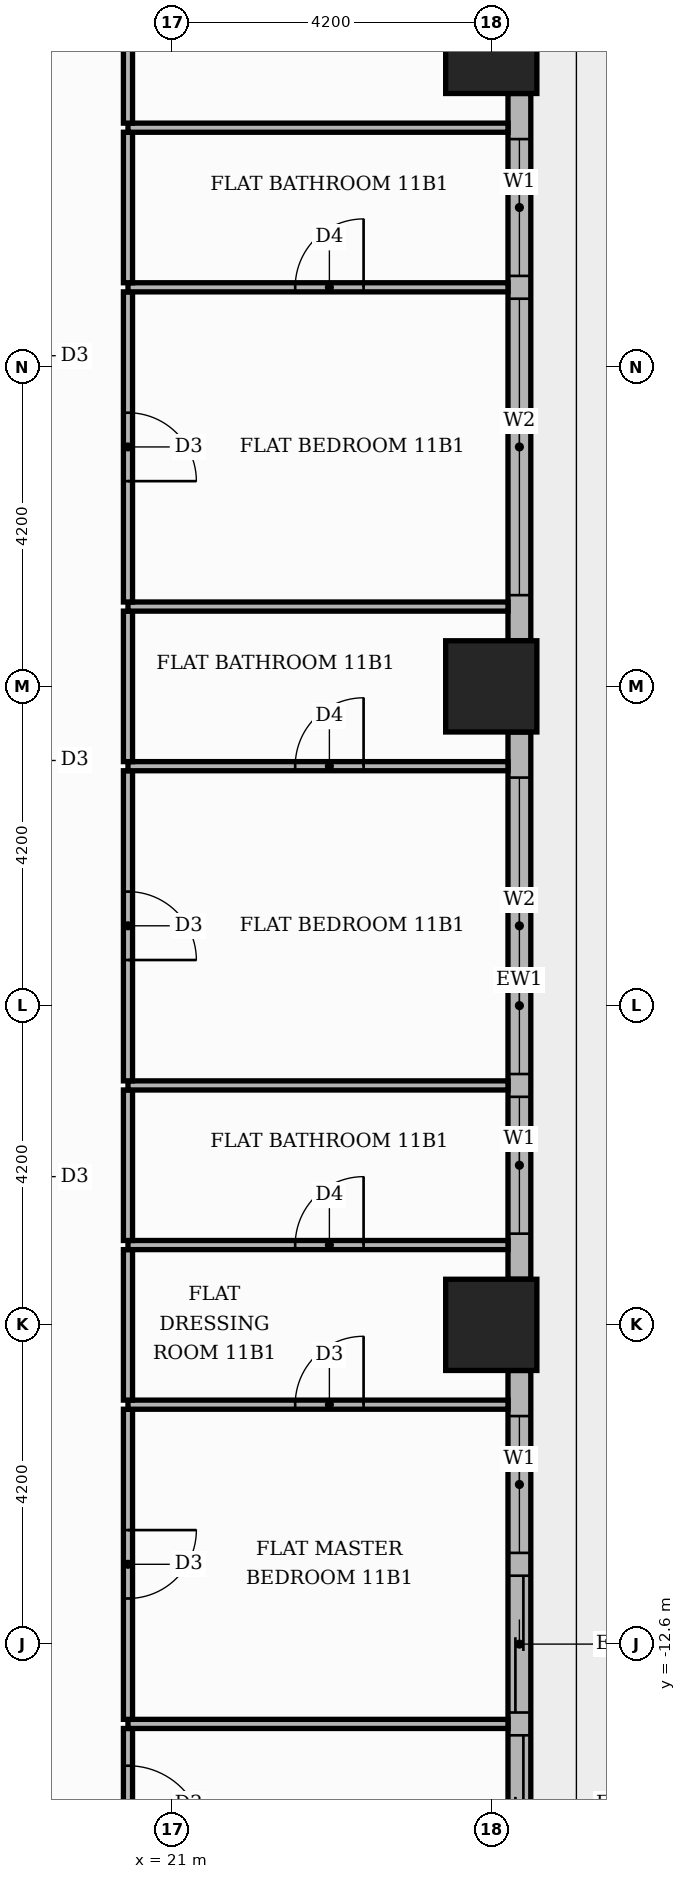
"""IFC4 building model, lengths in metres.
Left out: names, types, materials, properties, quantities, classifications, styles, units other than length and angle.
Written with IfcOpenShell. Run it as: python <this file> out.ifc"""

import sys

from ifc_helpers import new_model, si_unit, direction, frame, frame_2d, origin, origin_2d, place, context, subcontext, project, spatial, rectangle, extrude, element, fill, save


model = new_model("IFC4")
c1 = context("Model", 3, precision=1e-05, world=origin(), true_north=direction((0.0, 1.0)))
c2 = subcontext(c1, "Body", "Model", "MODEL_VIEW")
j1 = project(units=[si_unit("LENGTHUNIT", "METRE"), si_unit("PLANEANGLEUNIT", "RADIAN")], contexts=[c1])
p1 = place(None, origin())
s1 = spatial("IfcSite", under=j1, at=p1, CompositionType="ELEMENT")
p2 = place(p1, origin())
s2 = spatial("IfcBuilding", under=s1, at=p2, CompositionType="ELEMENT")
p3 = place(p2, frame((0.0, 0.0, 50.4)))
s3 = spatial("IfcBuildingStorey", under=s2, at=p3, CompositionType="ELEMENT", Elevation=50.4)
for number, where, z_axis, x_axis in (
    (1, (25.2, 0.0, 0.0), (0.0, 0.0, 1.0), (1.0, 0.0, 0.0)),
    (2, (25.2, 8.4, 0.0), (0.0, 0.0, 1.0), (1.0, 0.0, 0.0)),
    (3, (25.2, -8.4, 0.0), (0.0, 0.0, 1.0), (1.0, 0.0, 0.0)),
):
    element("IfcColumn", number, at=place(p3, frame(where, z_axis=z_axis, x_axis=x_axis)), inside=s3, PredefinedType="COLUMN", context=c2, shape_type="SweptSolid", body=[
        extrude(rectangle(XDim=1.2, YDim=1.2, at=origin_2d()), origin(), (0.0, 0.0, 1.0), 3.9),
    ])
p4 = place(p3, frame((25.57, -16.2, 0.0), z_axis=(0.0, 0.0, 1.0), x_axis=(0.0, 1.0, 0.0)))
e4 = element("IfcWall", 4, at=p4, inside=s3, PredefinedType="STANDARD", context=c2, shape_type="SweptSolid", body=[
    extrude(rectangle(XDim=7.2, YDim=0.3, at=frame_2d((3.6, 0.0))), origin(), (0.0, 0.0, 1.0), 3.48),
])
p5 = place(p4, frame((0.6, 0.0, 0.0)))
e5 = element("IfcOpeningElement", 5, at=p5, cuts=e4, PredefinedType="OPENING", context=c2, shape_type="SweptSolid", body=[
    extrude(rectangle(XDim=1.8, YDim=2.4, at=frame_2d((0.9, 1.2))), frame((0.0, 0.16, 0.0), z_axis=(0.0, -1.0, 0.0), x_axis=(1.0, 0.0, 0.0)), (0.0, 0.0, 1.0), 0.32),
])
p6 = place(p4, frame((2.7, 0.0, 0.0)))
e6 = element("IfcOpeningElement", 6, at=p6, cuts=e4, PredefinedType="OPENING", context=c2, shape_type="SweptSolid", body=[
    extrude(rectangle(XDim=1.8, YDim=2.4, at=frame_2d((0.9, 1.2))), frame((0.0, 0.16, 0.0), z_axis=(0.0, -1.0, 0.0), x_axis=(1.0, 0.0, 0.0)), (0.0, 0.0, 1.0), 0.32),
])
p7 = place(p4, frame((4.8, 0.0, 0.9)))
e7 = element("IfcOpeningElement", 7, at=p7, cuts=e4, PredefinedType="OPENING", context=c2, shape_type="SweptSolid", body=[
    extrude(rectangle(XDim=1.8, YDim=2.1, at=frame_2d((0.9, 1.05))), frame((0.0, 0.16, 0.0), z_axis=(0.0, -1.0, 0.0), x_axis=(1.0, 0.0, 0.0)), (0.0, 0.0, 1.0), 0.32),
])
p8 = place(p3, frame((25.57, -7.8, 0.0), z_axis=(0.0, 0.0, 1.0), x_axis=(0.0, 1.0, 0.0)))
e8 = element("IfcWall", 8, at=p8, inside=s3, PredefinedType="STANDARD", context=c2, shape_type="SweptSolid", body=[
    extrude(rectangle(XDim=7.2, YDim=0.3, at=frame_2d((3.6, 0.0))), origin(), (0.0, 0.0, 1.0), 3.48),
])
p9 = place(p8, frame((0.6, 0.0, 0.9)))
e9 = element("IfcOpeningElement", 9, at=p9, cuts=e8, PredefinedType="OPENING", context=c2, shape_type="SweptSolid", body=[
    extrude(rectangle(XDim=1.8, YDim=2.1, at=frame_2d((0.9, 1.05))), frame((0.0, 0.16, 0.0), z_axis=(0.0, -1.0, 0.0), x_axis=(1.0, 0.0, 0.0)), (0.0, 0.0, 1.0), 0.32),
])
p10 = place(p8, frame((2.7, 0.0, 0.9)))
e10 = element("IfcOpeningElement", 10, at=p10, cuts=e8, PredefinedType="OPENING", context=c2, shape_type="SweptSolid", body=[
    extrude(rectangle(XDim=3.9, YDim=2.1, at=frame_2d((1.95, 1.05))), frame((0.0, 0.16, 0.0), z_axis=(0.0, -1.0, 0.0), x_axis=(1.0, 0.0, 0.0)), (0.0, 0.0, 1.0), 0.32),
])
p11 = place(p3, frame((25.57, 0.6, 0.0), z_axis=(0.0, 0.0, 1.0), x_axis=(0.0, 1.0, 0.0)))
e11 = element("IfcWall", 11, at=p11, inside=s3, PredefinedType="STANDARD", context=c2, shape_type="SweptSolid", body=[
    extrude(rectangle(XDim=7.2, YDim=0.3, at=frame_2d((3.6, 0.0))), origin(), (0.0, 0.0, 1.0), 3.48),
])
p12 = place(p11, frame((0.6, 0.0, 0.9)))
e12 = element("IfcOpeningElement", 12, at=p12, cuts=e11, PredefinedType="OPENING", context=c2, shape_type="SweptSolid", body=[
    extrude(rectangle(XDim=3.9, YDim=2.1, at=frame_2d((1.95, 1.05))), frame((0.0, 0.16, 0.0), z_axis=(0.0, -1.0, 0.0), x_axis=(1.0, 0.0, 0.0)), (0.0, 0.0, 1.0), 0.32),
])
p13 = place(p11, frame((4.8, 0.0, 0.9)))
e13 = element("IfcOpeningElement", 13, at=p13, cuts=e11, PredefinedType="OPENING", context=c2, shape_type="SweptSolid", body=[
    extrude(rectangle(XDim=1.8, YDim=2.1, at=frame_2d((0.9, 1.05))), frame((0.0, 0.16, 0.0), z_axis=(0.0, -1.0, 0.0), x_axis=(1.0, 0.0, 0.0)), (0.0, 0.0, 1.0), 0.32),
])
p14 = place(p3, frame((20.42, -15.69, 0.0), z_axis=(0.0, 0.0, 1.0), x_axis=(0.0, 1.0, 0.0)))
e14 = element("IfcWall", 14, at=p14, inside=s3, PredefinedType="PARTITIONING", context=c2, shape_type="SweptSolid", body=[
    extrude(rectangle(XDim=1.98, YDim=0.12, at=frame_2d((0.99, 0.0))), origin(), (0.0, 0.0, 1.0), 3.48),
])
p15 = place(p14, frame((0.49, 0.0, 0.0)))
e15 = element("IfcOpeningElement", 15, at=p15, cuts=e14, PredefinedType="OPENING", context=c2, shape_type="SweptSolid", body=[
    extrude(rectangle(XDim=1.0, YDim=2.1, at=frame_2d((0.5, 1.05))), frame((0.0, 0.07, 0.0), z_axis=(0.0, -1.0, 0.0), x_axis=(1.0, 0.0, 0.0)), (0.0, 0.0, 1.0), 0.14),
])
p16 = place(p3, frame((20.42, -13.65, 0.0), z_axis=(0.0, 0.0, 1.0), x_axis=(1.0, 0.0, 0.0)))
e16 = element("IfcWall", 16, at=p16, inside=s3, PredefinedType="PARTITIONING", context=c2, shape_type="SweptSolid", body=[
    extrude(rectangle(XDim=5.0, YDim=0.12, at=frame_2d((2.5, 0.0))), origin(), (0.0, 0.0, 1.0), 3.48),
])
p17 = place(p3, frame((20.42, -13.59, 0.0), z_axis=(0.0, 0.0, 1.0), x_axis=(0.0, 1.0, 0.0)))
e17 = element("IfcWall", 17, at=p17, inside=s3, PredefinedType="PARTITIONING", context=c2, shape_type="SweptSolid", body=[
    extrude(rectangle(XDim=4.08, YDim=0.12, at=frame_2d((2.04, 0.0))), origin(), (0.0, 0.0, 1.0), 3.48),
])
p18 = place(p17, frame((1.59, 0.0, 0.0)))
e18 = element("IfcOpeningElement", 18, at=p18, cuts=e17, PredefinedType="OPENING", context=c2, shape_type="SweptSolid", body=[
    extrude(rectangle(XDim=0.9, YDim=2.1, at=frame_2d((0.45, 1.05))), frame((0.0, 0.07, 0.0), z_axis=(0.0, -1.0, 0.0), x_axis=(1.0, 0.0, 0.0)), (0.0, 0.0, 1.0), 0.14),
])
p19 = place(p3, frame((20.42, -9.45, 0.0), z_axis=(0.0, 0.0, 1.0), x_axis=(1.0, 0.0, 0.0)))
e19 = element("IfcWall", 19, at=p19, inside=s3, PredefinedType="PARTITIONING", context=c2, shape_type="SweptSolid", body=[
    extrude(rectangle(XDim=5.0, YDim=0.12, at=frame_2d((2.5, 0.0))), origin(), (0.0, 0.0, 1.0), 3.48),
])
p20 = place(p19, frame((2.2, 0.0, 0.0)))
e20 = element("IfcOpeningElement", 20, at=p20, cuts=e19, PredefinedType="OPENING", context=c2, shape_type="SweptSolid", body=[
    extrude(rectangle(XDim=0.9, YDim=2.1, at=frame_2d((0.45, 1.05))), frame((0.0, 0.07, 0.0), z_axis=(0.0, -1.0, 0.0), x_axis=(1.0, 0.0, 0.0)), (0.0, 0.0, 1.0), 0.14),
])
p21 = place(p3, frame((20.42, -9.39, 0.0), z_axis=(0.0, 0.0, 1.0), x_axis=(0.0, 1.0, 0.0)))
e21 = element("IfcWall", 21, at=p21, inside=s3, PredefinedType="PARTITIONING", context=c2, shape_type="SweptSolid", body=[
    extrude(rectangle(XDim=1.98, YDim=0.12, at=frame_2d((0.99, 0.0))), origin(), (0.0, 0.0, 1.0), 3.48),
])
p22 = place(p3, frame((20.42, -7.35, 0.0), z_axis=(0.0, 0.0, 1.0), x_axis=(1.0, 0.0, 0.0)))
e22 = element("IfcWall", 22, at=p22, inside=s3, PredefinedType="PARTITIONING", context=c2, shape_type="SweptSolid", body=[
    extrude(rectangle(XDim=5.0, YDim=0.12, at=frame_2d((2.5, 0.0))), origin(), (0.0, 0.0, 1.0), 3.48),
])
p23 = place(p22, frame((2.2, 0.0, 0.0)))
e23 = element("IfcOpeningElement", 23, at=p23, cuts=e22, PredefinedType="OPENING", context=c2, shape_type="SweptSolid", body=[
    extrude(rectangle(XDim=0.9, YDim=2.1, at=frame_2d((0.45, 1.05))), frame((0.0, 0.07, 0.0), z_axis=(0.0, -1.0, 0.0), x_axis=(1.0, 0.0, 0.0)), (0.0, 0.0, 1.0), 0.14),
])
p24 = place(p3, frame((20.42, -7.29, 0.0), z_axis=(0.0, 0.0, 1.0), x_axis=(0.0, 1.0, 0.0)))
e24 = element("IfcWall", 24, at=p24, inside=s3, PredefinedType="PARTITIONING", context=c2, shape_type="SweptSolid", body=[
    extrude(rectangle(XDim=1.98, YDim=0.12, at=frame_2d((0.99, 0.0))), origin(), (0.0, 0.0, 1.0), 3.48),
])
p25 = place(p3, frame((20.42, -5.25, 0.0), z_axis=(0.0, 0.0, 1.0), x_axis=(1.0, 0.0, 0.0)))
e25 = element("IfcWall", 25, at=p25, inside=s3, PredefinedType="PARTITIONING", context=c2, shape_type="SweptSolid", body=[
    extrude(rectangle(XDim=5.0, YDim=0.12, at=frame_2d((2.5, 0.0))), origin(), (0.0, 0.0, 1.0), 3.48),
])
p26 = place(p3, frame((20.42, -5.19, 0.0), z_axis=(0.0, 0.0, 1.0), x_axis=(0.0, 1.0, 0.0)))
e26 = element("IfcWall", 26, at=p26, inside=s3, PredefinedType="PARTITIONING", context=c2, shape_type="SweptSolid", body=[
    extrude(rectangle(XDim=4.08, YDim=0.12, at=frame_2d((2.04, 0.0))), origin(), (0.0, 0.0, 1.0), 3.48),
])
p27 = place(p26, frame((1.59, 0.0, 0.0)))
e27 = element("IfcOpeningElement", 27, at=p27, cuts=e26, PredefinedType="OPENING", context=c2, shape_type="SweptSolid", body=[
    extrude(rectangle(XDim=0.9, YDim=2.1, at=frame_2d((0.45, 1.05))), frame((0.0, 0.07, 0.0), z_axis=(0.0, -1.0, 0.0), x_axis=(1.0, 0.0, 0.0)), (0.0, 0.0, 1.0), 0.14),
])
p28 = place(p3, frame((20.42, -1.05, 0.0), z_axis=(0.0, 0.0, 1.0), x_axis=(1.0, 0.0, 0.0)))
e28 = element("IfcWall", 28, at=p28, inside=s3, PredefinedType="PARTITIONING", context=c2, shape_type="SweptSolid", body=[
    extrude(rectangle(XDim=5.0, YDim=0.12, at=frame_2d((2.5, 0.0))), origin(), (0.0, 0.0, 1.0), 3.48),
])
p29 = place(p28, frame((2.2, 0.0, 0.0)))
e29 = element("IfcOpeningElement", 29, at=p29, cuts=e28, PredefinedType="OPENING", context=c2, shape_type="SweptSolid", body=[
    extrude(rectangle(XDim=0.9, YDim=2.1, at=frame_2d((0.45, 1.05))), frame((0.0, 0.07, 0.0), z_axis=(0.0, -1.0, 0.0), x_axis=(1.0, 0.0, 0.0)), (0.0, 0.0, 1.0), 0.14),
])
p30 = place(p3, frame((20.42, -0.99, 0.0), z_axis=(0.0, 0.0, 1.0), x_axis=(0.0, 1.0, 0.0)))
e30 = element("IfcWall", 30, at=p30, inside=s3, PredefinedType="PARTITIONING", context=c2, shape_type="SweptSolid", body=[
    extrude(rectangle(XDim=1.98, YDim=0.12, at=frame_2d((0.99, 0.0))), origin(), (0.0, 0.0, 1.0), 3.48),
])
p31 = place(p3, frame((20.42, 1.05, 0.0), z_axis=(0.0, 0.0, 1.0), x_axis=(1.0, 0.0, 0.0)))
e31 = element("IfcWall", 31, at=p31, inside=s3, PredefinedType="PARTITIONING", context=c2, shape_type="SweptSolid", body=[
    extrude(rectangle(XDim=5.0, YDim=0.12, at=frame_2d((2.5, 0.0))), origin(), (0.0, 0.0, 1.0), 3.48),
])
p32 = place(p3, frame((20.42, 1.11, 0.0), z_axis=(0.0, 0.0, 1.0), x_axis=(0.0, 1.0, 0.0)))
e32 = element("IfcWall", 32, at=p32, inside=s3, PredefinedType="PARTITIONING", context=c2, shape_type="SweptSolid", body=[
    extrude(rectangle(XDim=4.08, YDim=0.12, at=frame_2d((2.04, 0.0))), origin(), (0.0, 0.0, 1.0), 3.48),
])
p33 = place(p32, frame((1.59, 0.0, 0.0)))
e33 = element("IfcOpeningElement", 33, at=p33, cuts=e32, PredefinedType="OPENING", context=c2, shape_type="SweptSolid", body=[
    extrude(rectangle(XDim=0.9, YDim=2.1, at=frame_2d((0.45, 1.05))), frame((0.0, 0.07, 0.0), z_axis=(0.0, -1.0, 0.0), x_axis=(1.0, 0.0, 0.0)), (0.0, 0.0, 1.0), 0.14),
])
p34 = place(p3, frame((20.42, 5.25, 0.0), z_axis=(0.0, 0.0, 1.0), x_axis=(1.0, 0.0, 0.0)))
e34 = element("IfcWall", 34, at=p34, inside=s3, PredefinedType="PARTITIONING", context=c2, shape_type="SweptSolid", body=[
    extrude(rectangle(XDim=5.0, YDim=0.12, at=frame_2d((2.5, 0.0))), origin(), (0.0, 0.0, 1.0), 3.48),
])
p35 = place(p34, frame((2.2, 0.0, 0.0)))
e35 = element("IfcOpeningElement", 35, at=p35, cuts=e34, PredefinedType="OPENING", context=c2, shape_type="SweptSolid", body=[
    extrude(rectangle(XDim=0.9, YDim=2.1, at=frame_2d((0.45, 1.05))), frame((0.0, 0.07, 0.0), z_axis=(0.0, -1.0, 0.0), x_axis=(1.0, 0.0, 0.0)), (0.0, 0.0, 1.0), 0.14),
])
p36 = place(p3, frame((20.42, 5.31, 0.0), z_axis=(0.0, 0.0, 1.0), x_axis=(0.0, 1.0, 0.0)))
e36 = element("IfcWall", 36, at=p36, inside=s3, PredefinedType="PARTITIONING", context=c2, shape_type="SweptSolid", body=[
    extrude(rectangle(XDim=1.98, YDim=0.12, at=frame_2d((0.99, 0.0))), origin(), (0.0, 0.0, 1.0), 3.48),
])
p37 = place(p3, frame((20.42, 7.35, 0.0), z_axis=(0.0, 0.0, 1.0), x_axis=(1.0, 0.0, 0.0)))
e37 = element("IfcWall", 37, at=p37, inside=s3, PredefinedType="PARTITIONING", context=c2, shape_type="SweptSolid", body=[
    extrude(rectangle(XDim=5.0, YDim=0.12, at=frame_2d((2.5, 0.0))), origin(), (0.0, 0.0, 1.0), 3.48),
])
p38 = place(p3, frame((20.42, 7.41, 0.0), z_axis=(0.0, 0.0, 1.0), x_axis=(0.0, 1.0, 0.0)))
e38 = element("IfcWall", 38, at=p38, inside=s3, PredefinedType="PARTITIONING", context=c2, shape_type="SweptSolid", body=[
    extrude(rectangle(XDim=4.08, YDim=0.12, at=frame_2d((2.04, 0.0))), origin(), (0.0, 0.0, 1.0), 3.48),
])
p39 = place(p38, frame((1.59, 0.0, 0.0)))
e39 = element("IfcOpeningElement", 39, at=p39, cuts=e38, PredefinedType="OPENING", context=c2, shape_type="SweptSolid", body=[
    extrude(rectangle(XDim=0.9, YDim=2.1, at=frame_2d((0.45, 1.05))), frame((0.0, 0.07, 0.0), z_axis=(0.0, -1.0, 0.0), x_axis=(1.0, 0.0, 0.0)), (0.0, 0.0, 1.0), 0.14),
])
p40 = place(p5, origin())
e40 = element("IfcDoor", 40, at=p40, inside=s3, OperationType="SLIDING_TO_LEFT", PredefinedType="DOOR", context=c2, shape_type="SweptSolid", body=[
    extrude(rectangle(XDim=1.8, YDim=2.4, at=frame_2d((0.9, 1.2))), frame((0.0, 0.025, 0.0), z_axis=(0.0, -1.0, 0.0), x_axis=(1.0, 0.0, 0.0)), (0.0, 0.0, 1.0), 0.05),
])
fill(e5, e40)
p41 = place(p6, origin())
e41 = element("IfcDoor", 41, at=p41, inside=s3, OperationType="SLIDING_TO_RIGHT", PredefinedType="DOOR", context=c2, shape_type="SweptSolid", body=[
    extrude(rectangle(XDim=1.8, YDim=2.4, at=frame_2d((0.9, 1.2))), frame((0.0, 0.025, 0.0), z_axis=(0.0, -1.0, 0.0), x_axis=(1.0, 0.0, 0.0)), (0.0, 0.0, 1.0), 0.05),
])
fill(e6, e41)
p42 = place(p7, origin())
e42 = element("IfcWindow", 42, at=p42, inside=s3, PartitioningType="SINGLE_PANEL", PredefinedType="WINDOW", context=c2, shape_type="SweptSolid", body=[
    extrude(rectangle(XDim=1.8, YDim=2.1, at=frame_2d((0.9, 1.05))), frame((0.0, 0.03, 0.0), z_axis=(0.0, -1.0, 0.0), x_axis=(1.0, 0.0, 0.0)), (0.0, 0.0, 1.0), 0.06),
])
fill(e7, e42)
p43 = place(p9, origin())
e43 = element("IfcWindow", 43, at=p43, inside=s3, PartitioningType="SINGLE_PANEL", PredefinedType="WINDOW", context=c2, shape_type="SweptSolid", body=[
    extrude(rectangle(XDim=1.8, YDim=2.1, at=frame_2d((0.9, 1.05))), frame((0.0, 0.03, 0.0), z_axis=(0.0, -1.0, 0.0), x_axis=(1.0, 0.0, 0.0)), (0.0, 0.0, 1.0), 0.06),
])
fill(e9, e43)
p44 = place(p10, origin())
e44 = element("IfcWindow", 44, at=p44, inside=s3, PartitioningType="SINGLE_PANEL", PredefinedType="WINDOW", context=c2, shape_type="SweptSolid", body=[
    extrude(rectangle(XDim=3.9, YDim=2.1, at=frame_2d((1.95, 1.05))), frame((0.0, 0.03, 0.0), z_axis=(0.0, -1.0, 0.0), x_axis=(1.0, 0.0, 0.0)), (0.0, 0.0, 1.0), 0.06),
])
fill(e10, e44)
p45 = place(p12, origin())
e45 = element("IfcWindow", 45, at=p45, inside=s3, PartitioningType="SINGLE_PANEL", PredefinedType="WINDOW", context=c2, shape_type="SweptSolid", body=[
    extrude(rectangle(XDim=3.9, YDim=2.1, at=frame_2d((1.95, 1.05))), frame((0.0, 0.03, 0.0), z_axis=(0.0, -1.0, 0.0), x_axis=(1.0, 0.0, 0.0)), (0.0, 0.0, 1.0), 0.06),
])
fill(e12, e45)
p46 = place(p13, origin())
e46 = element("IfcWindow", 46, at=p46, inside=s3, PartitioningType="SINGLE_PANEL", PredefinedType="WINDOW", context=c2, shape_type="SweptSolid", body=[
    extrude(rectangle(XDim=1.8, YDim=2.1, at=frame_2d((0.9, 1.05))), frame((0.0, 0.03, 0.0), z_axis=(0.0, -1.0, 0.0), x_axis=(1.0, 0.0, 0.0)), (0.0, 0.0, 1.0), 0.06),
])
fill(e13, e46)
p47 = place(p15, frame((1.0, 0.0, 0.0), z_axis=(0.0, 0.0, 1.0), x_axis=(-1.0, 0.0, 0.0)))
e47 = element("IfcDoor", 47, at=p47, inside=s3, OperationType="SINGLE_SWING_LEFT", PredefinedType="DOOR", context=c2, shape_type="SweptSolid", body=[
    extrude(rectangle(XDim=1.0, YDim=2.1, at=frame_2d((0.5, 1.05))), frame((0.0, 0.025, 0.0), z_axis=(0.0, -1.0, 0.0), x_axis=(1.0, 0.0, 0.0)), (0.0, 0.0, 1.0), 0.05),
])
fill(e15, e47)
p48 = place(p18, frame((0.9, 0.0, 0.0), z_axis=(0.0, 0.0, 1.0), x_axis=(-1.0, 0.0, 0.0)))
e48 = element("IfcDoor", 48, at=p48, inside=s3, OperationType="SINGLE_SWING_RIGHT", PredefinedType="DOOR", context=c2, shape_type="SweptSolid", body=[
    extrude(rectangle(XDim=0.9, YDim=2.1, at=frame_2d((0.45, 1.05))), frame((0.0, 0.025, 0.0), z_axis=(0.0, -1.0, 0.0), x_axis=(1.0, 0.0, 0.0)), (0.0, 0.0, 1.0), 0.05),
])
fill(e18, e48)
p49 = place(p20, origin())
e49 = element("IfcDoor", 49, at=p49, inside=s3, OperationType="SINGLE_SWING_RIGHT", PredefinedType="DOOR", context=c2, shape_type="SweptSolid", body=[
    extrude(rectangle(XDim=0.9, YDim=2.1, at=frame_2d((0.45, 1.05))), frame((0.0, 0.025, 0.0), z_axis=(0.0, -1.0, 0.0), x_axis=(1.0, 0.0, 0.0)), (0.0, 0.0, 1.0), 0.05),
])
fill(e20, e49)
p50 = place(p23, origin())
e50 = element("IfcDoor", 50, at=p50, inside=s3, OperationType="SINGLE_SWING_RIGHT", PredefinedType="DOOR", context=c2, shape_type="SweptSolid", body=[
    extrude(rectangle(XDim=0.9, YDim=2.1, at=frame_2d((0.45, 1.05))), frame((0.0, 0.025, 0.0), z_axis=(0.0, -1.0, 0.0), x_axis=(1.0, 0.0, 0.0)), (0.0, 0.0, 1.0), 0.05),
])
fill(e23, e50)
p51 = place(p27, frame((0.9, 0.0, 0.0), z_axis=(0.0, 0.0, 1.0), x_axis=(-1.0, 0.0, 0.0)))
e51 = element("IfcDoor", 51, at=p51, inside=s3, OperationType="SINGLE_SWING_LEFT", PredefinedType="DOOR", context=c2, shape_type="SweptSolid", body=[
    extrude(rectangle(XDim=0.9, YDim=2.1, at=frame_2d((0.45, 1.05))), frame((0.0, 0.025, 0.0), z_axis=(0.0, -1.0, 0.0), x_axis=(1.0, 0.0, 0.0)), (0.0, 0.0, 1.0), 0.05),
])
fill(e27, e51)
p52 = place(p29, origin())
e52 = element("IfcDoor", 52, at=p52, inside=s3, OperationType="SINGLE_SWING_RIGHT", PredefinedType="DOOR", context=c2, shape_type="SweptSolid", body=[
    extrude(rectangle(XDim=0.9, YDim=2.1, at=frame_2d((0.45, 1.05))), frame((0.0, 0.025, 0.0), z_axis=(0.0, -1.0, 0.0), x_axis=(1.0, 0.0, 0.0)), (0.0, 0.0, 1.0), 0.05),
])
fill(e29, e52)
p53 = place(p33, frame((0.9, 0.0, 0.0), z_axis=(0.0, 0.0, 1.0), x_axis=(-1.0, 0.0, 0.0)))
e53 = element("IfcDoor", 53, at=p53, inside=s3, OperationType="SINGLE_SWING_LEFT", PredefinedType="DOOR", context=c2, shape_type="SweptSolid", body=[
    extrude(rectangle(XDim=0.9, YDim=2.1, at=frame_2d((0.45, 1.05))), frame((0.0, 0.025, 0.0), z_axis=(0.0, -1.0, 0.0), x_axis=(1.0, 0.0, 0.0)), (0.0, 0.0, 1.0), 0.05),
])
fill(e33, e53)
p54 = place(p35, origin())
e54 = element("IfcDoor", 54, at=p54, inside=s3, OperationType="SINGLE_SWING_RIGHT", PredefinedType="DOOR", context=c2, shape_type="SweptSolid", body=[
    extrude(rectangle(XDim=0.9, YDim=2.1, at=frame_2d((0.45, 1.05))), frame((0.0, 0.025, 0.0), z_axis=(0.0, -1.0, 0.0), x_axis=(1.0, 0.0, 0.0)), (0.0, 0.0, 1.0), 0.05),
])
fill(e35, e54)
save(model, sys.argv[1])
